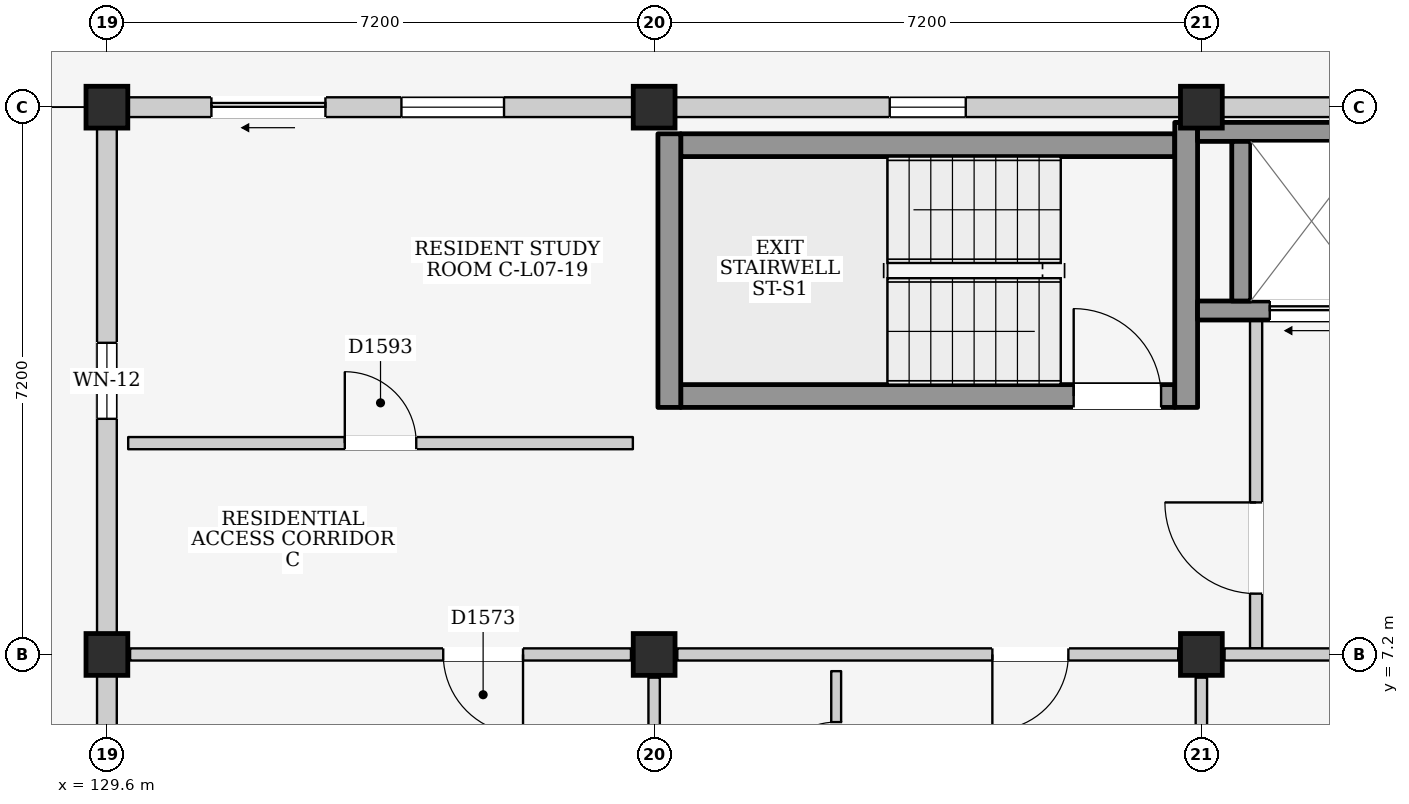
"""IFC4 building model, lengths in metres.
Left out: names, types, materials, properties, quantities, classifications, styles, units other than length and angle.
Written with IfcOpenShell. Run it as: python <this file> out.ifc"""

import sys

from ifc_helpers import new_model, si_unit, direction, frame, frame_2d, origin, origin_2d, place, context, subcontext, project, spatial, rectangle, extrude, element, fill, save


model = new_model("IFC4")
c1 = context("Model", 3, precision=1e-05, world=origin(), true_north=direction((0.0, 1.0)))
c2 = subcontext(c1, "Body", "Model", "MODEL_VIEW")
j1 = project(units=[si_unit("LENGTHUNIT", "METRE"), si_unit("PLANEANGLEUNIT", "RADIAN")], contexts=[c1])
p1 = place(None, origin())
s1 = spatial("IfcSite", under=j1, at=p1, CompositionType="ELEMENT")
p2 = place(p1, origin())
s2 = spatial("IfcBuilding", under=s1, at=p2, CompositionType="ELEMENT")
p3 = place(p2, frame((0.0, 0.0, 25.1)))
s3 = spatial("IfcBuildingStorey", under=s2, at=p3, CompositionType="ELEMENT", Elevation=25.1)
for number, where, z_axis, x_axis in (
    (1, (129.6, 7.2, 0.0), (0.0, 0.0, 1.0), (1.0, 0.0, 0.0)),
    (2, (129.6, 14.4, 0.0), (0.0, 0.0, 1.0), (1.0, 0.0, 0.0)),
    (3, (136.8, 7.2, 0.0), (0.0, 0.0, 1.0), (1.0, 0.0, 0.0)),
    (4, (136.8, 14.4, 0.0), (0.0, 0.0, 1.0), (1.0, 0.0, 0.0)),
    (5, (144.0, 7.2, 0.0), (0.0, 0.0, 1.0), (1.0, 0.0, 0.0)),
    (6, (144.0, 14.4, 0.0), (0.0, 0.0, 1.0), (1.0, 0.0, 0.0)),
):
    element("IfcColumn", number, at=place(p3, frame(where, z_axis=z_axis, x_axis=x_axis)), inside=s3, PredefinedType="COLUMN", context=c2, shape_type="SweptSolid", body=[
        extrude(rectangle(XDim=0.55, YDim=0.55, at=origin_2d()), origin(), (0.0, 0.0, 1.0), 3.2),
    ])
p4 = place(p3, frame((129.6, 0.275, 0.0), z_axis=(0.0, 0.0, 1.0), x_axis=(0.0, 1.0, 0.0)))
e7 = element("IfcWall", 7, at=p4, inside=s3, PredefinedType="ELEMENTEDWALL", context=c2, shape_type="SweptSolid", body=[
    extrude(rectangle(XDim=6.65, YDim=0.26, at=frame_2d((3.325, 0.0))), origin(), (0.0, 0.0, 1.0), 2.475),
])
p5 = place(p4, frame((1.4, 0.0, 0.0)))
e8 = element("IfcOpeningElement", 8, at=p5, cuts=e7, PredefinedType="OPENING", context=c2, shape_type="SweptSolid", body=[
    extrude(rectangle(XDim=1.4, YDim=2.1, at=frame_2d((0.7, 1.05))), frame((0.0, 0.145, 0.0), z_axis=(0.0, -1.0, 0.0), x_axis=(1.0, 0.0, 0.0)), (0.0, 0.0, 1.0), 0.29),
])
p6 = place(p4, frame((4.4, 0.0, 0.95)))
e9 = element("IfcOpeningElement", 9, at=p6, cuts=e7, PredefinedType="OPENING", context=c2, shape_type="SweptSolid", body=[
    extrude(rectangle(XDim=1.2, YDim=1.35, at=frame_2d((0.6, 0.675))), frame((0.0, 0.145, 0.0), z_axis=(0.0, -1.0, 0.0), x_axis=(1.0, 0.0, 0.0)), (0.0, 0.0, 1.0), 0.29),
])
p7 = place(p3, frame((129.875, 14.4, 0.0), z_axis=(0.0, 0.0, 1.0), x_axis=(1.0, 0.0, 0.0)))
e10 = element("IfcWall", 10, at=p7, inside=s3, PredefinedType="ELEMENTEDWALL", context=c2, shape_type="SweptSolid", body=[
    extrude(rectangle(XDim=6.65, YDim=0.26, at=frame_2d((3.325, 0.0))), origin(), (0.0, 0.0, 1.0), 2.375),
])
p8 = place(p7, frame((1.1, 0.0, 0.0)))
e11 = element("IfcOpeningElement", 11, at=p8, cuts=e10, PredefinedType="OPENING", context=c2, shape_type="SweptSolid", body=[
    extrude(rectangle(XDim=1.5, YDim=2.12, at=frame_2d((0.75, 1.06))), frame((0.0, 0.145, 0.0), z_axis=(0.0, -1.0, 0.0), x_axis=(1.0, 0.0, 0.0)), (0.0, 0.0, 1.0), 0.29),
])
p9 = place(p7, frame((3.6, 0.0, 0.765)))
e12 = element("IfcOpeningElement", 12, at=p9, cuts=e10, PredefinedType="OPENING", context=c2, shape_type="SweptSolid", body=[
    extrude(rectangle(XDim=1.35, YDim=1.5, at=frame_2d((0.675, 0.75))), frame((0.0, 0.145, 0.0), z_axis=(0.0, -1.0, 0.0), x_axis=(1.0, 0.0, 0.0)), (0.0, 0.0, 1.0), 0.29),
])
p10 = place(p3, frame((129.6, 7.475, 0.0), z_axis=(0.0, 0.0, 1.0), x_axis=(0.0, 1.0, 0.0)))
e13 = element("IfcWall", 13, at=p10, inside=s3, PredefinedType="ELEMENTEDWALL", context=c2, shape_type="SweptSolid", body=[
    extrude(rectangle(XDim=6.65, YDim=0.26, at=frame_2d((3.325, 0.0))), origin(), (0.0, 0.0, 1.0), 2.475),
])
p11 = place(p10, frame((2.825, 0.0, 1.1)))
e14 = element("IfcOpeningElement", 14, at=p11, cuts=e13, PredefinedType="OPENING", context=c2, shape_type="SweptSolid", body=[
    extrude(rectangle(XDim=1.0, YDim=0.9, at=frame_2d((0.5, 0.45))), frame((0.0, 0.145, 0.0), z_axis=(0.0, -1.0, 0.0), x_axis=(1.0, 0.0, 0.0)), (0.0, 0.0, 1.0), 0.29),
])
p12 = place(p3, frame((137.075, 14.4, 0.0), z_axis=(0.0, 0.0, 1.0), x_axis=(1.0, 0.0, 0.0)))
e15 = element("IfcWall", 15, at=p12, inside=s3, PredefinedType="ELEMENTEDWALL", context=c2, shape_type="SweptSolid", body=[
    extrude(rectangle(XDim=6.65, YDim=0.26, at=frame_2d((3.325, 0.0))), origin(), (0.0, 0.0, 1.0), 2.375),
])
p13 = place(p12, frame((2.825, 0.0, 1.2)))
e16 = element("IfcOpeningElement", 16, at=p13, cuts=e15, PredefinedType="OPENING", context=c2, shape_type="SweptSolid", body=[
    extrude(rectangle(XDim=1.0, YDim=0.9, at=frame_2d((0.5, 0.45))), frame((0.0, 0.145, 0.0), z_axis=(0.0, -1.0, 0.0), x_axis=(1.0, 0.0, 0.0)), (0.0, 0.0, 1.0), 0.29),
])
p14 = place(p3, frame((144.275, 14.4, 0.0), z_axis=(0.0, 0.0, 1.0), x_axis=(1.0, 0.0, 0.0)))
e17 = element("IfcWall", 17, at=p14, inside=s3, PredefinedType="ELEMENTEDWALL", context=c2, shape_type="SweptSolid", body=[
    extrude(rectangle(XDim=6.65, YDim=0.26, at=frame_2d((3.325, 0.0))), origin(), (0.0, 0.0, 1.0), 2.375),
])
p15 = place(p14, frame((2.825, 0.0, 1.2)))
e18 = element("IfcOpeningElement", 18, at=p15, cuts=e17, PredefinedType="OPENING", context=c2, shape_type="SweptSolid", body=[
    extrude(rectangle(XDim=1.0, YDim=0.9, at=frame_2d((0.5, 0.45))), frame((0.0, 0.145, 0.0), z_axis=(0.0, -1.0, 0.0), x_axis=(1.0, 0.0, 0.0)), (0.0, 0.0, 1.0), 0.29),
])
p16 = place(p3, frame((137.15, 10.6, 0.0), z_axis=(0.0, 0.0, 1.0), x_axis=(1.0, 0.0, 0.0)))
e19 = element("IfcWall", 19, at=p16, inside=s3, PredefinedType="SHEAR", context=c2, shape_type="SweptSolid", body=[
    extrude(rectangle(XDim=6.5, YDim=0.3, at=frame_2d((3.25, 0.0))), origin(), (0.0, 0.0, 1.0), 2.99),
])
p17 = place(p16, frame((5.17, 0.0, 0.0)))
e20 = element("IfcOpeningElement", 20, at=p17, cuts=e19, PredefinedType="OPENING", context=c2, shape_type="SweptSolid", body=[
    extrude(rectangle(XDim=1.15, YDim=2.2, at=frame_2d((0.575, 1.1))), frame((0.0, 0.165, 0.0), z_axis=(0.0, -1.0, 0.0), x_axis=(1.0, 0.0, 0.0)), (0.0, 0.0, 1.0), 0.33),
])
p18 = place(p3, frame((137.15, 13.9, 0.0), z_axis=(0.0, 0.0, 1.0), x_axis=(1.0, 0.0, 0.0)))
e21 = element("IfcWall", 21, at=p18, inside=s3, PredefinedType="SHEAR", context=c2, shape_type="SweptSolid", body=[
    extrude(rectangle(XDim=6.5, YDim=0.3, at=frame_2d((3.25, 0.0))), origin(), (0.0, 0.0, 1.0), 2.99),
])
p19 = place(p3, frame((137.0, 10.45, 0.0), z_axis=(0.0, 0.0, 1.0), x_axis=(0.0, 1.0, 0.0)))
e22 = element("IfcWall", 22, at=p19, inside=s3, PredefinedType="SHEAR", context=c2, shape_type="SweptSolid", body=[
    extrude(rectangle(XDim=3.6, YDim=0.3, at=frame_2d((1.8, 0.0))), origin(), (0.0, 0.0, 1.0), 2.99),
])
p20 = place(p3, frame((143.8, 10.45, 0.0), z_axis=(0.0, 0.0, 1.0), x_axis=(0.0, 1.0, 0.0)))
e23 = element("IfcWall", 23, at=p20, inside=s3, PredefinedType="SHEAR", context=c2, shape_type="SweptSolid", body=[
    extrude(rectangle(XDim=3.75, YDim=0.3, at=frame_2d((1.875, 0.0))), origin(), (0.0, 0.0, 1.0), 2.99),
])
p21 = place(p3, frame((144.72, 7.28, 0.0), z_axis=(0.0, 0.0, 1.0), x_axis=(0.0, 1.0, 0.0)))
e24 = element("IfcWall", 24, at=p21, inside=s3, PredefinedType="PARTITIONING", context=c2, shape_type="SweptSolid", body=[
    extrude(rectangle(XDim=4.32, YDim=0.16, at=frame_2d((2.16, 0.0))), origin(), (0.0, 0.0, 1.0), 2.99),
])
p22 = place(p21, frame((0.72, 0.0, 0.0)))
e25 = element("IfcOpeningElement", 25, at=p22, cuts=e24, PredefinedType="OPENING", context=c2, shape_type="SweptSolid", body=[
    extrude(rectangle(XDim=1.2, YDim=2.2, at=frame_2d((0.6, 1.1))), frame((0.0, 0.095, 0.0), z_axis=(0.0, -1.0, 0.0), x_axis=(1.0, 0.0, 0.0)), (0.0, 0.0, 1.0), 0.19),
])
p23 = place(p3, frame((143.95, 11.725, 0.0), z_axis=(0.0, 0.0, 1.0), x_axis=(1.0, 0.0, 0.0)))
e26 = element("IfcWall", 26, at=p23, inside=s3, PredefinedType="SHEAR", context=c2, shape_type="SweptSolid", body=[
    extrude(rectangle(XDim=2.55, YDim=0.25, at=frame_2d((1.275, 0.0))), origin(), (0.0, 0.0, 1.0), 2.99),
])
p24 = place(p23, frame((0.95, 0.0, 0.0)))
e27 = element("IfcOpeningElement", 27, at=p24, cuts=e26, PredefinedType="OPENING", context=c2, shape_type="SweptSolid", body=[
    extrude(rectangle(XDim=1.1, YDim=2.15, at=frame_2d((0.55, 1.075))), frame((0.0, 0.14, 0.0), z_axis=(0.0, -1.0, 0.0), x_axis=(1.0, 0.0, 0.0)), (0.0, 0.0, 1.0), 0.28),
])
p25 = place(p3, frame((143.95, 14.075, 0.0), z_axis=(0.0, 0.0, 1.0), x_axis=(1.0, 0.0, 0.0)))
e28 = element("IfcWall", 28, at=p25, inside=s3, PredefinedType="SHEAR", context=c2, shape_type="SweptSolid", body=[
    extrude(rectangle(XDim=2.55, YDim=0.25, at=frame_2d((1.275, 0.0))), origin(), (0.0, 0.0, 1.0), 2.99),
])
p26 = place(p3, frame((144.525, 11.85, 0.0), z_axis=(0.0, 0.0, 1.0), x_axis=(0.0, 1.0, 0.0)))
e29 = element("IfcWall", 29, at=p26, inside=s3, PredefinedType="SHEAR", context=c2, shape_type="SweptSolid", body=[
    extrude(rectangle(XDim=2.1, YDim=0.25, at=frame_2d((1.05, 0.0))), origin(), (0.0, 0.0, 1.0), 2.99),
])
p27 = place(p3, frame((129.905, 7.2, 0.0), z_axis=(0.0, 0.0, 1.0), x_axis=(1.0, 0.0, 0.0)))
e30 = element("IfcWall", 30, at=p27, inside=s3, PredefinedType="PARTITIONING", context=c2, shape_type="SweptSolid", body=[
    extrude(rectangle(XDim=6.59, YDim=0.16, at=frame_2d((3.295, 0.0))), origin(), (0.0, 0.0, 1.0), 2.375),
])
p28 = place(p27, frame((4.12, 0.0, 0.0)))
e31 = element("IfcOpeningElement", 31, at=p28, cuts=e30, PredefinedType="OPENING", context=c2, shape_type="SweptSolid", body=[
    extrude(rectangle(XDim=1.05, YDim=2.2, at=frame_2d((0.525, 1.1))), frame((0.0, 0.095, 0.0), z_axis=(0.0, -1.0, 0.0), x_axis=(1.0, 0.0, 0.0)), (0.0, 0.0, 1.0), 0.19),
])
p29 = place(p3, frame((136.8, 0.305, 0.0), z_axis=(0.0, 0.0, 1.0), x_axis=(0.0, 1.0, 0.0)))
e32 = element("IfcWall", 32, at=p29, inside=s3, PredefinedType="PARTITIONING", context=c2, shape_type="SweptSolid", body=[
    extrude(rectangle(XDim=6.59, YDim=0.15, at=frame_2d((3.295, 0.0))), origin(), (0.0, 0.0, 1.0), 2.475),
])
p30 = place(p3, frame((137.105, 7.2, 0.0), z_axis=(0.0, 0.0, 1.0), x_axis=(1.0, 0.0, 0.0)))
e33 = element("IfcWall", 33, at=p30, inside=s3, PredefinedType="PARTITIONING", context=c2, shape_type="SweptSolid", body=[
    extrude(rectangle(XDim=6.59, YDim=0.16, at=frame_2d((3.295, 0.0))), origin(), (0.0, 0.0, 1.0), 2.375),
])
p31 = place(p30, frame((4.145, 0.0, 0.0)))
e34 = element("IfcOpeningElement", 34, at=p31, cuts=e33, PredefinedType="OPENING", context=c2, shape_type="SweptSolid", body=[
    extrude(rectangle(XDim=1.0, YDim=2.15, at=frame_2d((0.5, 1.075))), frame((0.0, 0.095, 0.0), z_axis=(0.0, -1.0, 0.0), x_axis=(1.0, 0.0, 0.0)), (0.0, 0.0, 1.0), 0.19),
])
p32 = place(p3, frame((144.0, 0.305, 0.0), z_axis=(0.0, 0.0, 1.0), x_axis=(0.0, 1.0, 0.0)))
e35 = element("IfcWall", 35, at=p32, inside=s3, PredefinedType="PARTITIONING", context=c2, shape_type="SweptSolid", body=[
    extrude(rectangle(XDim=6.59, YDim=0.15, at=frame_2d((3.295, 0.0))), origin(), (0.0, 0.0, 1.0), 2.475),
])
p33 = place(p3, frame((139.195, 4.76, 0.0), z_axis=(0.0, 0.0, 1.0), x_axis=(0.0, 1.0, 0.0)))
e36 = element("IfcWall", 36, at=p33, inside=s3, PredefinedType="PARTITIONING", context=c2, shape_type="SweptSolid", body=[
    extrude(rectangle(XDim=2.22, YDim=0.13, at=frame_2d((1.11, 0.0))), origin(), (0.0, 0.0, 1.0), 2.99),
])
p34 = place(p33, frame((0.67, 0.0, 0.0)))
e37 = element("IfcOpeningElement", 37, at=p34, cuts=e36, PredefinedType="OPENING", context=c2, shape_type="SweptSolid", body=[
    extrude(rectangle(XDim=0.88, YDim=2.1, at=frame_2d((0.44, 1.05))), frame((0.0, 0.08, 0.0), z_axis=(0.0, -1.0, 0.0), x_axis=(1.0, 0.0, 0.0)), (0.0, 0.0, 1.0), 0.16),
])
p35 = place(p3, frame((144.305, 7.2, 0.0), z_axis=(0.0, 0.0, 1.0), x_axis=(1.0, 0.0, 0.0)))
e38 = element("IfcWall", 38, at=p35, inside=s3, PredefinedType="PARTITIONING", context=c2, shape_type="SweptSolid", body=[
    extrude(rectangle(XDim=6.59, YDim=0.16, at=frame_2d((3.295, 0.0))), origin(), (0.0, 0.0, 1.0), 2.375),
])
p36 = place(p3, frame((129.88, 9.98, 0.0), z_axis=(0.0, 0.0, 1.0), x_axis=(1.0, 0.0, 0.0)))
e39 = element("IfcWall", 39, at=p36, inside=s3, PredefinedType="PARTITIONING", context=c2, shape_type="SweptSolid", body=[
    extrude(rectangle(XDim=6.64, YDim=0.16, at=frame_2d((3.32, 0.0))), origin(), (0.0, 0.0, 1.0), 2.99),
])
p37 = place(p36, frame((2.85, 0.0, 0.0)))
e40 = element("IfcOpeningElement", 40, at=p37, cuts=e39, PredefinedType="OPENING", context=c2, shape_type="SweptSolid", body=[
    extrude(rectangle(XDim=0.94, YDim=2.12, at=frame_2d((0.47, 1.06))), frame((0.0, 0.095, 0.0), z_axis=(0.0, -1.0, 0.0), x_axis=(1.0, 0.0, 0.0)), (0.0, 0.0, 1.0), 0.19),
])
p38 = place(p8, frame((1.5, 0.0, 0.0), z_axis=(0.0, 0.0, 1.0), x_axis=(-1.0, 0.0, 0.0)))
e41 = element("IfcDoor", 41, at=p38, inside=s3, OperationType="SLIDING_TO_LEFT", PredefinedType="DOOR", context=c2, shape_type="SweptSolid", body=[
    extrude(rectangle(XDim=1.5, YDim=2.12, at=frame_2d((0.75, 1.06))), frame((0.0, 0.025, 0.0), z_axis=(0.0, -1.0, 0.0), x_axis=(1.0, 0.0, 0.0)), (0.0, 0.0, 1.0), 0.05),
])
fill(e11, e41)
p39 = place(p9, origin())
e42 = element("IfcWindow", 42, at=p39, inside=s3, PartitioningType="SINGLE_PANEL", PredefinedType="WINDOW", context=c2, shape_type="SweptSolid", body=[
    extrude(rectangle(XDim=1.35, YDim=1.5, at=frame_2d((0.675, 0.75))), frame((0.0, 0.03, 0.0), z_axis=(0.0, -1.0, 0.0), x_axis=(1.0, 0.0, 0.0)), (0.0, 0.0, 1.0), 0.06),
])
fill(e12, e42)
p40 = place(p11, origin())
e43 = element("IfcWindow", 43, at=p40, inside=s3, PartitioningType="SINGLE_PANEL", PredefinedType="WINDOW", context=c2, shape_type="SweptSolid", body=[
    extrude(rectangle(XDim=1.0, YDim=0.9, at=frame_2d((0.5, 0.45))), frame((0.0, 0.03, 0.0), z_axis=(0.0, -1.0, 0.0), x_axis=(1.0, 0.0, 0.0)), (0.0, 0.0, 1.0), 0.06),
])
fill(e14, e43)
p41 = place(p13, origin())
e44 = element("IfcWindow", 44, at=p41, inside=s3, PartitioningType="SINGLE_PANEL", PredefinedType="WINDOW", context=c2, shape_type="SweptSolid", body=[
    extrude(rectangle(XDim=1.0, YDim=0.9, at=frame_2d((0.5, 0.45))), frame((0.0, 0.03, 0.0), z_axis=(0.0, -1.0, 0.0), x_axis=(1.0, 0.0, 0.0)), (0.0, 0.0, 1.0), 0.06),
])
fill(e16, e44)
p42 = place(p17, origin())
e45 = element("IfcDoor", 45, at=p42, inside=s3, OperationType="SINGLE_SWING_LEFT", PredefinedType="DOOR", context=c2, shape_type="SweptSolid", body=[
    extrude(rectangle(XDim=1.15, YDim=2.2, at=frame_2d((0.575, 1.1))), frame((0.0, 0.025, 0.0), z_axis=(0.0, -1.0, 0.0), x_axis=(1.0, 0.0, 0.0)), (0.0, 0.0, 1.0), 0.05),
])
fill(e20, e45)
p43 = place(p22, origin())
e46 = element("IfcDoor", 46, at=p43, inside=s3, OperationType="SINGLE_SWING_RIGHT", PredefinedType="DOOR", context=c2, shape_type="SweptSolid", body=[
    extrude(rectangle(XDim=1.2, YDim=2.2, at=frame_2d((0.6, 1.1))), frame((0.0, 0.025, 0.0), z_axis=(0.0, -1.0, 0.0), x_axis=(1.0, 0.0, 0.0)), (0.0, 0.0, 1.0), 0.05),
])
fill(e25, e46)
p44 = place(p24, frame((1.1, 0.0, 0.0), z_axis=(0.0, 0.0, 1.0), x_axis=(-1.0, 0.0, 0.0)))
e47 = element("IfcDoor", 47, at=p44, inside=s3, OperationType="SLIDING_TO_LEFT", PredefinedType="DOOR", context=c2, shape_type="SweptSolid", body=[
    extrude(rectangle(XDim=1.1, YDim=2.15, at=frame_2d((0.55, 1.075))), frame((0.0, 0.025, 0.0), z_axis=(0.0, -1.0, 0.0), x_axis=(1.0, 0.0, 0.0)), (0.0, 0.0, 1.0), 0.05),
])
fill(e27, e47)
p45 = place(p28, frame((1.05, 0.0, 0.0), z_axis=(0.0, 0.0, 1.0), x_axis=(-1.0, 0.0, 0.0)))
e48 = element("IfcDoor", 48, at=p45, inside=s3, OperationType="SINGLE_SWING_LEFT", PredefinedType="DOOR", context=c2, shape_type="SweptSolid", body=[
    extrude(rectangle(XDim=1.05, YDim=2.2, at=frame_2d((0.525, 1.1))), frame((0.0, 0.025, 0.0), z_axis=(0.0, -1.0, 0.0), x_axis=(1.0, 0.0, 0.0)), (0.0, 0.0, 1.0), 0.05),
])
fill(e31, e48)
p46 = place(p31, frame((1.0, 0.0, 0.0), z_axis=(0.0, 0.0, 1.0), x_axis=(-1.0, 0.0, 0.0)))
e49 = element("IfcDoor", 49, at=p46, inside=s3, OperationType="SINGLE_SWING_RIGHT", PredefinedType="DOOR", context=c2, shape_type="SweptSolid", body=[
    extrude(rectangle(XDim=1.0, YDim=2.15, at=frame_2d((0.5, 1.075))), frame((0.0, 0.025, 0.0), z_axis=(0.0, -1.0, 0.0), x_axis=(1.0, 0.0, 0.0)), (0.0, 0.0, 1.0), 0.05),
])
fill(e34, e49)
p47 = place(p34, origin())
e50 = element("IfcDoor", 50, at=p47, inside=s3, OperationType="SINGLE_SWING_LEFT", PredefinedType="DOOR", context=c2, shape_type="SweptSolid", body=[
    extrude(rectangle(XDim=0.88, YDim=2.1, at=frame_2d((0.44, 1.05))), frame((0.0, 0.025, 0.0), z_axis=(0.0, -1.0, 0.0), x_axis=(1.0, 0.0, 0.0)), (0.0, 0.0, 1.0), 0.05),
])
fill(e37, e50)
p48 = place(p37, origin())
e51 = element("IfcDoor", 51, at=p48, inside=s3, OperationType="SINGLE_SWING_LEFT", PredefinedType="DOOR", context=c2, shape_type="SweptSolid", body=[
    extrude(rectangle(XDim=0.94, YDim=2.12, at=frame_2d((0.47, 1.06))), frame((0.0, 0.025, 0.0), z_axis=(0.0, -1.0, 0.0), x_axis=(1.0, 0.0, 0.0)), (0.0, 0.0, 1.0), 0.05),
])
fill(e40, e51)
save(model, sys.argv[1])
